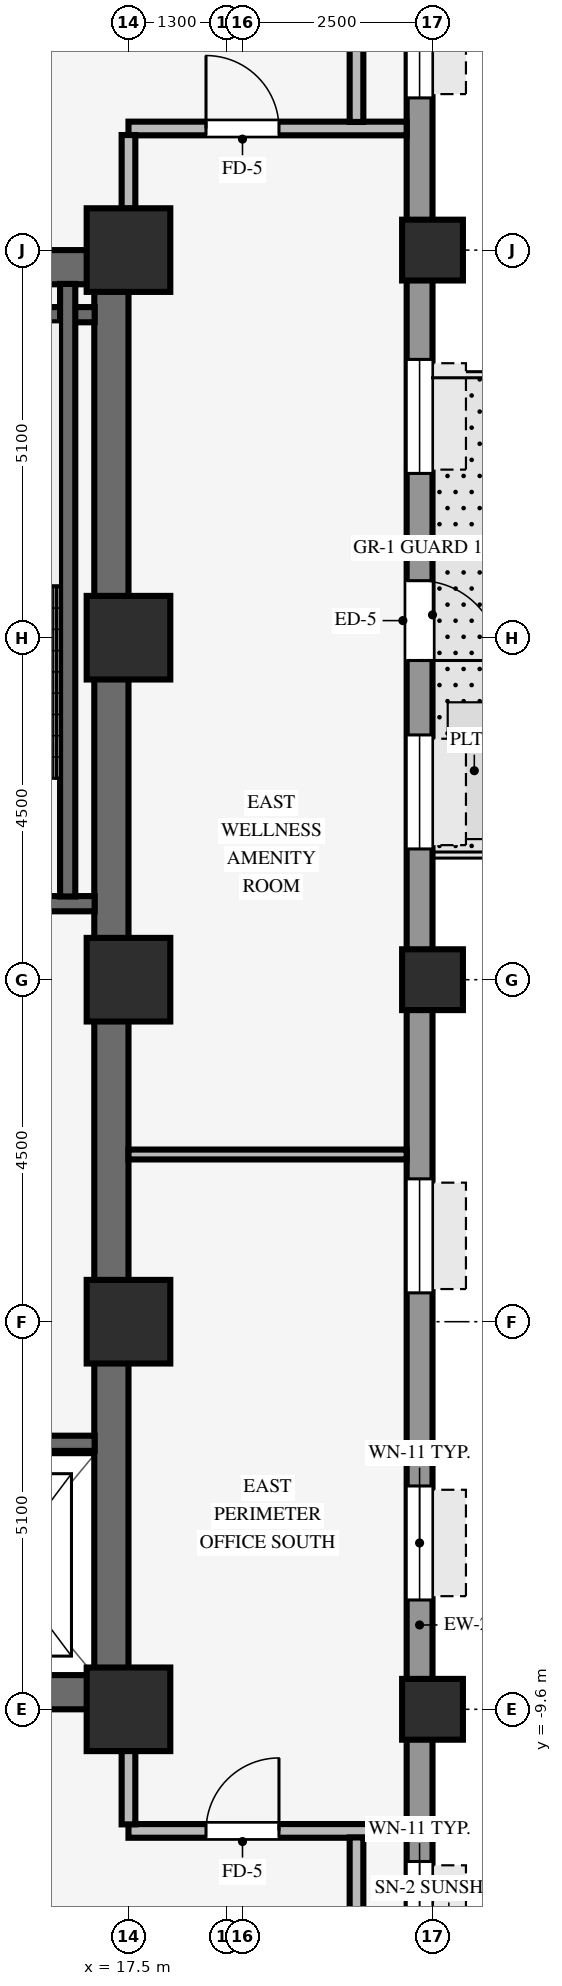
"""IFC4 building model, lengths in metres.
Left out: names, types, materials, properties, quantities, classifications, styles, units other than length and angle.
Written with IfcOpenShell. Run it as: python <this file> out.ifc"""

import sys

from ifc_helpers import new_model, si_unit, direction, frame, frame_2d, origin, origin_2d, place, context, subcontext, project, spatial, rectangle, hollow_rectangle, extrude, source, transform, mapped, element, fill, save


model = new_model("IFC4")
c1 = context("Model", 3, precision=1e-05, world=origin(), true_north=direction((0.0, 1.0)))
c2 = subcontext(c1, "Body", "Model", "MODEL_VIEW")
j1 = project(units=[si_unit("LENGTHUNIT", "METRE"), si_unit("PLANEANGLEUNIT", "RADIAN")], contexts=[c1])
p1 = place(None, origin())
s1 = spatial("IfcSite", under=j1, at=p1, CompositionType="ELEMENT")
p2 = place(p1, origin())
s2 = spatial("IfcBuilding", under=s1, at=p2, CompositionType="ELEMENT")
p3 = place(p2, frame((0.0, 0.0, 56.8)))
s3 = spatial("IfcBuildingStorey", under=s2, at=p3, CompositionType="ELEMENT", Elevation=56.8)
for number, where, z_axis, x_axis in (
    (1, (9.0, -9.375, 0.0), (0.0, 0.0, 1.0), (1.0, 0.0, 0.0)),
    (2, (9.0, 9.375, 0.0), (0.0, 0.0, 1.0), (1.0, 0.0, 0.0)),
):
    element("IfcWall", number, at=place(p3, frame(where, z_axis=z_axis, x_axis=x_axis)), inside=s3, PredefinedType="SHEAR", context=c2, shape_type="SweptSolid", body=[
        extrude(rectangle(XDim=8.5, YDim=0.45, at=frame_2d((4.25, 0.0))), origin(), (0.0, 0.0, 1.0), 3.37),
    ])
p4 = place(p3, frame((17.275, -9.155, 0.0), z_axis=(0.0, 0.0, 1.0), x_axis=(0.0, 1.0, 0.0)))
e3 = element("IfcWall", 3, at=p4, inside=s3, PredefinedType="SHEAR", context=c2, shape_type="SweptSolid", body=[
    extrude(rectangle(XDim=18.31, YDim=0.45, at=frame_2d((9.155, 0.0))), origin(), (0.0, 0.0, 1.0), 3.37),
])
for number, where, z_axis, x_axis in (
    (4, (17.5, -9.6, 0.0), (0.0, 0.0, 1.0), (1.0, 0.0, 0.0)),
    (5, (17.5, -4.5, 0.0), (0.0, 0.0, 1.0), (1.0, 0.0, 0.0)),
    (6, (17.5, 4.5, 0.0), (0.0, 0.0, 1.0), (1.0, 0.0, 0.0)),
    (7, (17.5, 9.6, 0.0), (0.0, 0.0, 1.0), (1.0, 0.0, 0.0)),
    (8, (17.5, 0.0, 0.0), (0.0, 0.0, 1.0), (1.0, 0.0, 0.0)),
):
    element("IfcColumn", number, at=place(p3, frame(where, z_axis=z_axis, x_axis=x_axis)), inside=s3, PredefinedType="COLUMN", context=c2, shape_type="SweptSolid", body=[
        extrude(rectangle(XDim=1.1, YDim=1.1, at=origin_2d()), origin(), (0.0, 0.0, 1.0), 3.37),
    ])
for number, where, z_axis, x_axis in (
    (9, (21.5, -9.6, -0.4), (0.0, 0.0, 1.0), (1.0, 0.0, 0.0)),
    (10, (21.5, 0.0, -0.4), (0.0, 0.0, 1.0), (1.0, 0.0, 0.0)),
    (11, (21.5, 9.6, -0.4), (0.0, 0.0, 1.0), (1.0, 0.0, 0.0)),
):
    element("IfcColumn", number, at=place(p3, frame(where, z_axis=z_axis, x_axis=x_axis)), inside=s3, PredefinedType="COLUMN", context=c2, shape_type="SweptSolid", body=[
        extrude(hollow_rectangle(XDim=0.8, YDim=0.8, WallThickness=0.055, InnerFilletRadius=0.055, OuterFilletRadius=0.11, at=origin_2d()), origin(), (0.0, 0.0, 1.0), 3.77),
    ])
p5 = place(p3, frame((21.33, -20.764, 0.0), z_axis=(0.0, 0.0, 1.0), x_axis=(0.0, 1.0, 0.0)))
e12 = element("IfcWall", 12, at=p5, inside=s3, PredefinedType="STANDARD", context=c2, shape_type="SweptSolid", body=[
    extrude(rectangle(XDim=41.528, YDim=0.34, at=frame_2d((20.764, 0.0))), origin(), (0.0, 0.0, 1.0), 2.705),
])
p6 = place(p5, frame((26.014, 0.0, 0.0), z_axis=(0.0, 0.0, 1.0), x_axis=(-1.0, 0.0, 0.0)))
e13 = element("IfcOpeningElement", 13, at=p6, cuts=e12, PredefinedType="OPENING", context=c2, shape_type="SweptSolid", body=[
    extrude(rectangle(XDim=1.05, YDim=2.1, at=frame_2d((0.525, 1.05))), frame((0.0, 0.18, 0.0), z_axis=(0.0, -1.0, 0.0), x_axis=(1.0, 0.0, 0.0)), (0.0, 0.0, 1.0), 0.36),
])
p7 = place(p5, frame((1.371, 0.0, 0.8)))
e14 = element("IfcOpeningElement", 14, at=p7, cuts=e12, PredefinedType="OPENING", context=c2, shape_type="SweptSolid", body=[
    extrude(rectangle(XDim=1.5, YDim=1.6, at=frame_2d((0.75, 0.8))), frame((0.0, 0.18, 0.0), z_axis=(0.0, -1.0, 0.0), x_axis=(1.0, 0.0, 0.0)), (0.0, 0.0, 1.0), 0.36),
])
p8 = place(p5, frame((7.662, 0.0, 0.8)))
e15 = element("IfcOpeningElement", 15, at=p8, cuts=e12, PredefinedType="OPENING", context=c2, shape_type="SweptSolid", body=[
    extrude(rectangle(XDim=1.5, YDim=1.6, at=frame_2d((0.75, 0.8))), frame((0.0, 0.18, 0.0), z_axis=(0.0, -1.0, 0.0), x_axis=(1.0, 0.0, 0.0)), (0.0, 0.0, 1.0), 0.36),
])
p9 = place(p5, frame((12.603, 0.0, 0.8)))
e16 = element("IfcOpeningElement", 16, at=p9, cuts=e12, PredefinedType="OPENING", context=c2, shape_type="SweptSolid", body=[
    extrude(rectangle(XDim=1.5, YDim=1.6, at=frame_2d((0.75, 0.8))), frame((0.0, 0.18, 0.0), z_axis=(0.0, -1.0, 0.0), x_axis=(1.0, 0.0, 0.0)), (0.0, 0.0, 1.0), 0.36),
])
p10 = place(p5, frame((16.644, 0.0, 0.8)))
e17 = element("IfcOpeningElement", 17, at=p10, cuts=e12, PredefinedType="OPENING", context=c2, shape_type="SweptSolid", body=[
    extrude(rectangle(XDim=1.5, YDim=1.6, at=frame_2d((0.75, 0.8))), frame((0.0, 0.18, 0.0), z_axis=(0.0, -1.0, 0.0), x_axis=(1.0, 0.0, 0.0)), (0.0, 0.0, 1.0), 0.36),
])
p11 = place(p5, frame((22.485, 0.0, 0.8)))
e18 = element("IfcOpeningElement", 18, at=p11, cuts=e12, PredefinedType="OPENING", context=c2, shape_type="SweptSolid", body=[
    extrude(rectangle(XDim=1.5, YDim=1.6, at=frame_2d((0.75, 0.8))), frame((0.0, 0.18, 0.0), z_axis=(0.0, -1.0, 0.0), x_axis=(1.0, 0.0, 0.0)), (0.0, 0.0, 1.0), 0.36),
])
p12 = place(p5, frame((27.426, 0.0, 0.8)))
e19 = element("IfcOpeningElement", 19, at=p12, cuts=e12, PredefinedType="OPENING", context=c2, shape_type="SweptSolid", body=[
    extrude(rectangle(XDim=1.5, YDim=1.6, at=frame_2d((0.75, 0.8))), frame((0.0, 0.18, 0.0), z_axis=(0.0, -1.0, 0.0), x_axis=(1.0, 0.0, 0.0)), (0.0, 0.0, 1.0), 0.36),
])
p13 = place(p5, frame((32.366, 0.0, 0.8)))
e20 = element("IfcOpeningElement", 20, at=p13, cuts=e12, PredefinedType="OPENING", context=c2, shape_type="SweptSolid", body=[
    extrude(rectangle(XDim=1.5, YDim=1.6, at=frame_2d((0.75, 0.8))), frame((0.0, 0.18, 0.0), z_axis=(0.0, -1.0, 0.0), x_axis=(1.0, 0.0, 0.0)), (0.0, 0.0, 1.0), 0.36),
])
p14 = place(p5, frame((38.657, 0.0, 0.8)))
e21 = element("IfcOpeningElement", 21, at=p14, cuts=e12, PredefinedType="OPENING", context=c2, shape_type="SweptSolid", body=[
    extrude(rectangle(XDim=1.5, YDim=1.6, at=frame_2d((0.75, 0.8))), frame((0.0, 0.18, 0.0), z_axis=(0.0, -1.0, 0.0), x_axis=(1.0, 0.0, 0.0)), (0.0, 0.0, 1.0), 0.36),
])
for number, where, z_axis, x_axis in (
    (22, (13.535, 1.0, 0.0), (0.0, 0.0, 1.0), (1.0, 0.0, 0.0)),
    (23, (13.535, 8.75, 0.0), (0.0, 0.0, 1.0), (1.0, 0.0, 0.0)),
):
    element("IfcWall", number, at=place(p3, frame(where, z_axis=z_axis, x_axis=x_axis)), inside=s3, PredefinedType="SHEAR", context=c2, shape_type="SweptSolid", body=[
        extrude(rectangle(XDim=3.52, YDim=0.2, at=frame_2d((1.76, 0.0))), origin(), (0.0, 0.0, 1.0), 3.37),
    ])
p15 = place(p3, frame((16.7, 1.095, 0.0), z_axis=(0.0, 0.0, 1.0), x_axis=(0.0, 1.0, 0.0)))
e24 = element("IfcWall", 24, at=p15, inside=s3, PredefinedType="SHEAR", context=c2, shape_type="SweptSolid", body=[
    extrude(rectangle(XDim=8.06, YDim=0.2, at=frame_2d((4.03, 0.0))), origin(), (0.0, 0.0, 1.0), 3.37),
])
p16 = place(p3, frame((14.645, -6.1, 0.0), z_axis=(0.0, 0.0, 1.0), x_axis=(1.0, 0.0, 0.0)))
e25 = element("IfcWall", 25, at=p16, inside=s3, PredefinedType="SHEAR", context=c2, shape_type="SweptSolid", body=[
    extrude(rectangle(XDim=2.41, YDim=0.2, at=frame_2d((1.205, 0.0))), origin(), (0.0, 0.0, 1.0), 3.37),
])
p17 = place(p3, frame((17.5, -11.2, 0.0), z_axis=(0.0, 0.0, 1.0), x_axis=(1.0, 0.0, 0.0)))
e26 = element("IfcWall", 26, at=p17, inside=s3, PredefinedType="PARTITIONING", context=c2, shape_type="SweptSolid", body=[
    extrude(rectangle(XDim=3.66, YDim=0.18, at=frame_2d((1.83, 0.0))), origin(), (0.0, 0.0, 1.0), 3.36),
])
p18 = place(p17, frame((1.02, 0.0, 0.0)))
e27 = element("IfcOpeningElement", 27, at=p18, cuts=e26, PredefinedType="OPENING", context=c2, shape_type="SweptSolid", body=[
    extrude(rectangle(XDim=0.96, YDim=2.1, at=frame_2d((0.48, 1.05))), frame((0.0, 0.1, 0.0), z_axis=(0.0, -1.0, 0.0), x_axis=(1.0, 0.0, 0.0)), (0.0, 0.0, 1.0), 0.2),
])
p19 = place(p3, frame((17.5, -2.3, 0.0), z_axis=(0.0, 0.0, 1.0), x_axis=(1.0, 0.0, 0.0)))
e28 = element("IfcWall", 28, at=p19, inside=s3, PredefinedType="PARTITIONING", context=c2, shape_type="SweptSolid", body=[
    extrude(rectangle(XDim=3.66, YDim=0.13, at=frame_2d((1.83, 0.0))), origin(), (0.0, 0.0, 1.0), 3.36),
])
p20 = place(p3, frame((17.5, 11.2, 0.0), z_axis=(0.0, 0.0, 1.0), x_axis=(1.0, 0.0, 0.0)))
e29 = element("IfcWall", 29, at=p20, inside=s3, PredefinedType="PARTITIONING", context=c2, shape_type="SweptSolid", body=[
    extrude(rectangle(XDim=3.66, YDim=0.18, at=frame_2d((1.83, 0.0))), origin(), (0.0, 0.0, 1.0), 3.36),
])
p21 = place(p20, frame((1.02, 0.0, 0.0)))
e30 = element("IfcOpeningElement", 30, at=p21, cuts=e29, PredefinedType="OPENING", context=c2, shape_type="SweptSolid", body=[
    extrude(rectangle(XDim=0.96, YDim=2.1, at=frame_2d((0.48, 1.05))), frame((0.0, 0.1, 0.0), z_axis=(0.0, -1.0, 0.0), x_axis=(1.0, 0.0, 0.0)), (0.0, 0.0, 1.0), 0.2),
])
for number, where, z_axis, x_axis in (
    (31, (17.5, -11.114, 0.0), (0.0, 0.0, 1.0), (0.0, 1.0, 0.0)),
    (32, (17.5, 10.146, 0.0), (0.0, 0.0, 1.0), (0.0, 1.0, 0.0)),
):
    element("IfcWall", number, at=place(p3, frame(where, z_axis=z_axis, x_axis=x_axis)), inside=s3, PredefinedType="PARTITIONING", context=c2, shape_type="SweptSolid", body=[
        extrude(rectangle(XDim=0.968, YDim=0.18, at=frame_2d((0.484, 0.0))), origin(), (0.0, 0.0, 1.0), 2.738),
    ])
for number, where, z_axis, x_axis in (
    (33, (20.5, -13.514, 0.0), (0.0, 0.0, 1.0), (0.0, 1.0, 0.0)),
    (34, (20.5, 11.286, 0.0), (0.0, 0.0, 1.0), (0.0, 1.0, 0.0)),
):
    element("IfcWall", number, at=place(p3, frame(where, z_axis=z_axis, x_axis=x_axis)), inside=s3, PredefinedType="PARTITIONING", context=c2, shape_type="SweptSolid", body=[
        extrude(rectangle(XDim=2.228, YDim=0.18, at=frame_2d((1.114, 0.0))), origin(), (0.0, 0.0, 1.0), 3.36),
    ])
m1 = source(origin(), c2, "Body", "SweptSolid", [
    extrude(rectangle(XDim=1.05, YDim=2.1, at=frame_2d((0.525, 1.05))), frame((0.0, 0.025, 0.0), z_axis=(0.0, -1.0, 0.0), x_axis=(1.0, 0.0, 0.0)), (0.0, 0.0, 1.0), 0.05),
])
p22 = place(p6, origin())
e35 = element("IfcDoor", 35, at=p22, inside=s3, OperationType="SINGLE_SWING_RIGHT", PredefinedType="DOOR", context=c2, shape_type="MappedRepresentation", body=[
    mapped(m1, transform((0.0, 0.0, 0.0), scale=1.0)),
])
fill(e13, e35)
m2 = source(origin(), c2, "Body", "SweptSolid", [
    extrude(rectangle(XDim=1.5, YDim=1.6, at=frame_2d((0.75, 0.8))), frame((0.0, 0.03, 0.0), z_axis=(0.0, -1.0, 0.0), x_axis=(1.0, 0.0, 0.0)), (0.0, 0.0, 1.0), 0.06),
])
p23 = place(p8, origin())
e36 = element("IfcWindow", 36, at=p23, inside=s3, PartitioningType="SINGLE_PANEL", PredefinedType="WINDOW", context=c2, shape_type="MappedRepresentation", body=[
    mapped(m2, transform((0.0, 0.0, 0.0), scale=1.0)),
])
fill(e15, e36)
p24 = place(p9, origin())
e37 = element("IfcWindow", 37, at=p24, inside=s3, PartitioningType="SINGLE_PANEL", PredefinedType="WINDOW", context=c2, shape_type="MappedRepresentation", body=[
    mapped(m2, transform((0.0, 0.0, 0.0), scale=1.0)),
])
fill(e16, e37)
p25 = place(p10, origin())
e38 = element("IfcWindow", 38, at=p25, inside=s3, PartitioningType="SINGLE_PANEL", PredefinedType="WINDOW", context=c2, shape_type="MappedRepresentation", body=[
    mapped(m2, transform((0.0, 0.0, 0.0), scale=1.0)),
])
fill(e17, e38)
p26 = place(p11, origin())
e39 = element("IfcWindow", 39, at=p26, inside=s3, PartitioningType="SINGLE_PANEL", PredefinedType="WINDOW", context=c2, shape_type="MappedRepresentation", body=[
    mapped(m2, transform((0.0, 0.0, 0.0), scale=1.0)),
])
fill(e18, e39)
p27 = place(p12, origin())
e40 = element("IfcWindow", 40, at=p27, inside=s3, PartitioningType="SINGLE_PANEL", PredefinedType="WINDOW", context=c2, shape_type="MappedRepresentation", body=[
    mapped(m2, transform((0.0, 0.0, 0.0), scale=1.0)),
])
fill(e19, e40)
p28 = place(p13, origin())
e41 = element("IfcWindow", 41, at=p28, inside=s3, PartitioningType="SINGLE_PANEL", PredefinedType="WINDOW", context=c2, shape_type="MappedRepresentation", body=[
    mapped(m2, transform((0.0, 0.0, 0.0), scale=1.0)),
])
fill(e20, e41)
m3 = source(origin(), c2, "Body", "SweptSolid", [
    extrude(rectangle(XDim=0.96, YDim=2.1, at=frame_2d((0.48, 1.05))), frame((0.0, 0.025, 0.0), z_axis=(0.0, -1.0, 0.0), x_axis=(1.0, 0.0, 0.0)), (0.0, 0.0, 1.0), 0.05),
])
p29 = place(p18, origin())
e42 = element("IfcDoor", 42, at=p29, inside=s3, OperationType="SINGLE_SWING_RIGHT", PredefinedType="DOOR", context=c2, shape_type="MappedRepresentation", body=[
    mapped(m3, transform((0.0, 0.0, 0.0), scale=1.0)),
])
fill(e27, e42)
p30 = place(p21, origin())
e43 = element("IfcDoor", 43, at=p30, inside=s3, OperationType="SINGLE_SWING_LEFT", PredefinedType="DOOR", context=c2, shape_type="MappedRepresentation", body=[
    mapped(m3, transform((0.0, 0.0, 0.0), scale=1.0)),
])
fill(e30, e43)
save(model, sys.argv[1])
